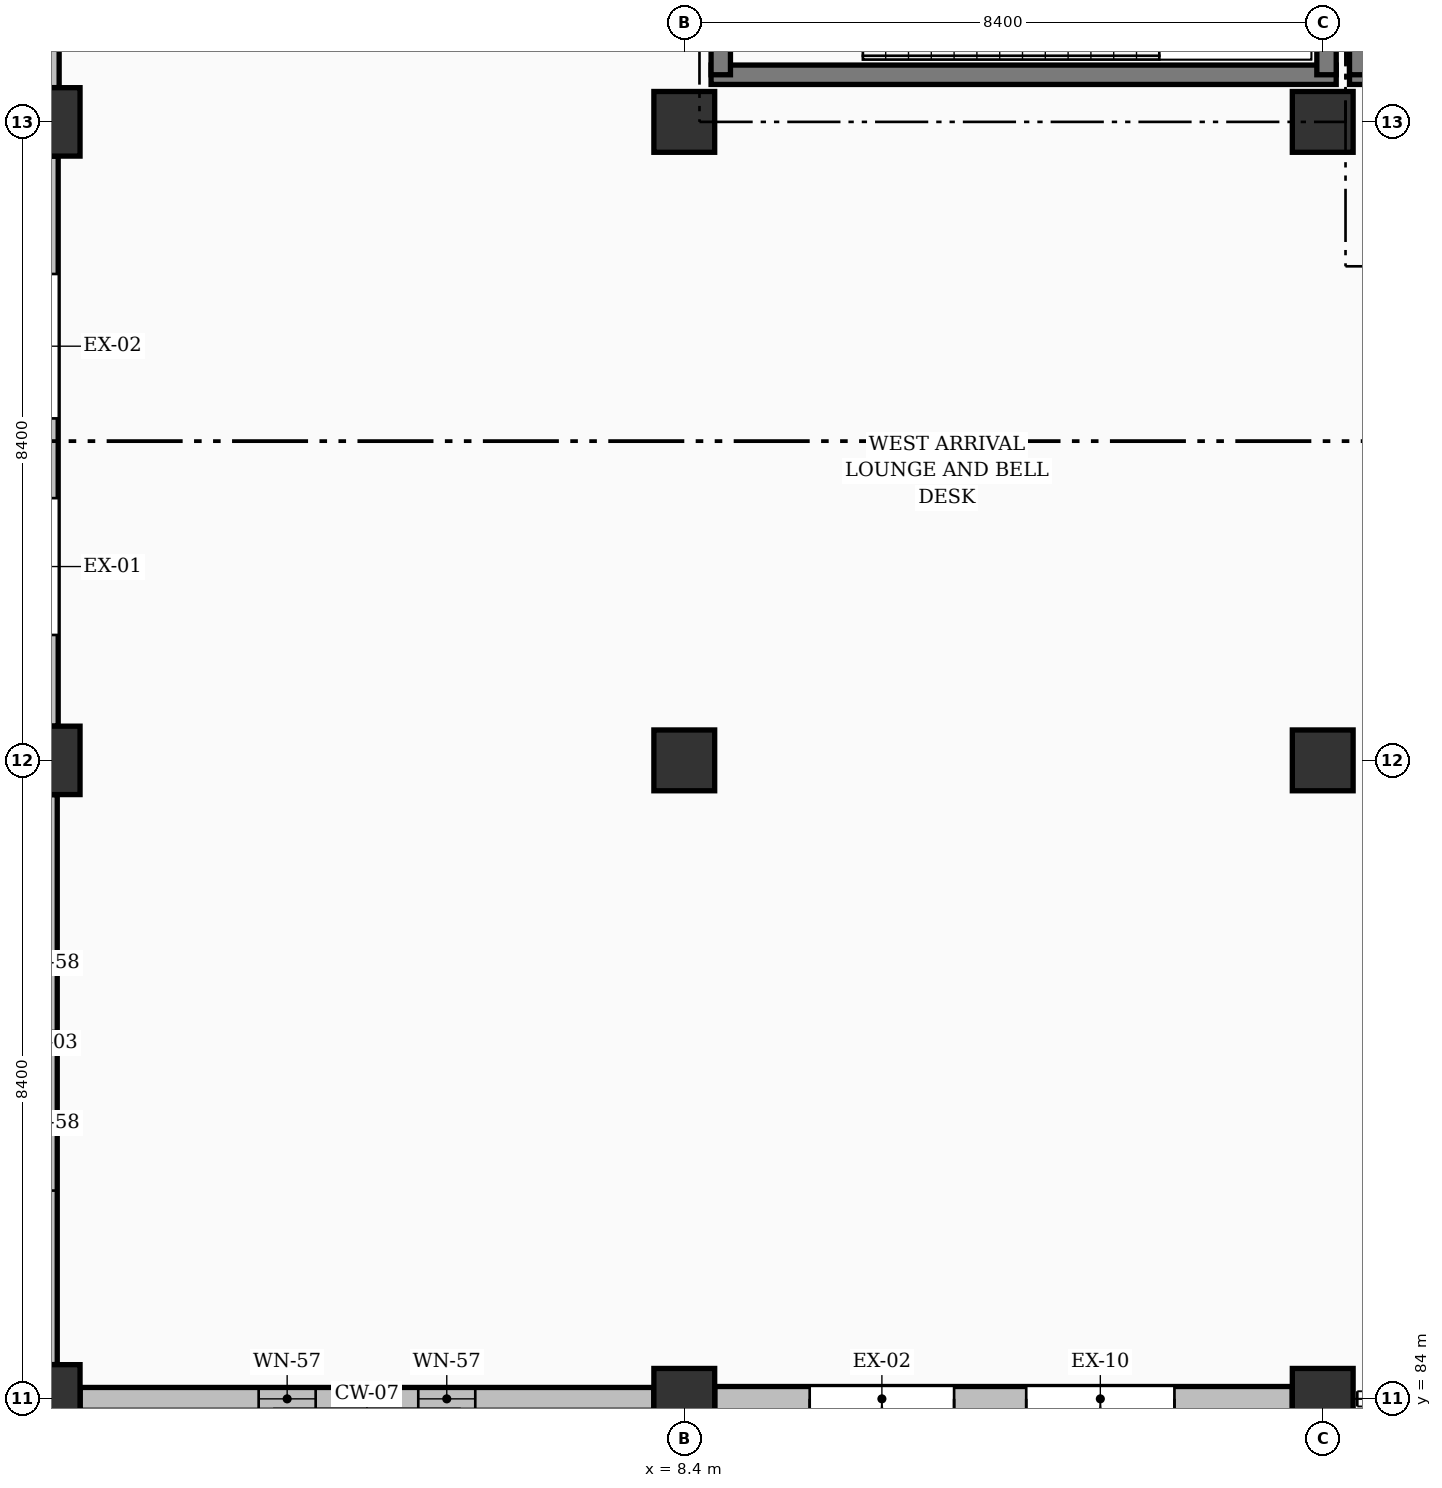
"""IFC4 building model, lengths in metres.
Left out: names, types, materials, properties, quantities, classifications, styles, units other than length and angle.
Written with IfcOpenShell. Run it as: python <this file> out.ifc"""

import sys

from ifc_helpers import new_model, si_unit, direction, frame, frame_2d, origin, origin_2d, place, context, subcontext, project, spatial, rectangle, extrude, element, fill, save


model = new_model("IFC4")
c1 = context("Model", 3, precision=1e-05, world=origin(), true_north=direction((0.0, 1.0)))
c2 = subcontext(c1, "Body", "Model", "MODEL_VIEW")
j1 = project(units=[si_unit("LENGTHUNIT", "METRE"), si_unit("PLANEANGLEUNIT", "RADIAN")], contexts=[c1])
p1 = place(None, origin())
s1 = spatial("IfcSite", under=j1, at=p1, CompositionType="ELEMENT")
p2 = place(p1, origin())
s2 = spatial("IfcBuilding", under=s1, at=p2, CompositionType="ELEMENT")
p3 = place(p2, origin())
s3 = spatial("IfcBuildingStorey", under=s2, at=p3, CompositionType="ELEMENT", Elevation=0.0)
for number, where, z_axis, x_axis in (
    (1, (0.0, 84.0, 0.0), (0.0, 0.0, 1.0), (1.0, 0.0, 0.0)),
    (2, (0.0, 92.4, 0.0), (0.0, 0.0, 1.0), (1.0, 0.0, 0.0)),
    (3, (0.0, 100.8, 0.0), (0.0, 0.0, 1.0), (1.0, 0.0, 0.0)),
):
    element("IfcColumn", number, at=place(p3, frame(where, z_axis=z_axis, x_axis=x_axis)), inside=s3, PredefinedType="COLUMN", context=c2, shape_type="SweptSolid", body=[
        extrude(rectangle(XDim=0.9, YDim=0.9, at=origin_2d()), origin(), (0.0, 0.0, 1.0), 3.92),
    ])
for number, where, z_axis, x_axis in (
    (4, (8.4, 84.0, 0.0), (0.0, 0.0, 1.0), (1.0, 0.0, 0.0)),
    (5, (8.4, 92.4, 0.0), (0.0, 0.0, 1.0), (1.0, 0.0, 0.0)),
    (6, (8.4, 100.8, 0.0), (0.0, 0.0, 1.0), (1.0, 0.0, 0.0)),
    (7, (16.8, 84.0, 0.0), (0.0, 0.0, 1.0), (1.0, 0.0, 0.0)),
    (8, (16.8, 92.4, 0.0), (0.0, 0.0, 1.0), (1.0, 0.0, 0.0)),
    (9, (16.8, 100.8, 0.0), (0.0, 0.0, 1.0), (1.0, 0.0, 0.0)),
):
    element("IfcColumn", number, at=place(p3, frame(where, z_axis=z_axis, x_axis=x_axis)), inside=s3, PredefinedType="COLUMN", context=c2, shape_type="SweptSolid", body=[
        extrude(rectangle(XDim=0.8, YDim=0.8, at=origin_2d()), origin(), (0.0, 0.0, 1.0), 3.92),
    ])
p4 = place(p3, frame((0.451, 84.0, 0.0), z_axis=(0.0, 0.0, 1.0), x_axis=(1.0, 0.0, 0.0)))
e10 = element("IfcWall", 10, at=p4, inside=s3, PredefinedType="SOLIDWALL", context=c2, shape_type="SweptSolid", body=[
    extrude(rectangle(XDim=7.548, YDim=0.3, at=frame_2d((3.774, 0.0))), origin(), (0.0, 0.0, 1.0), 2.825),
])
p5 = place(p4, frame((2.349, 0.0, 0.3)))
e11 = element("IfcOpeningElement", 11, at=p5, cuts=e10, PredefinedType="OPENING", context=c2, shape_type="SweptSolid", body=[
    extrude(rectangle(XDim=0.75, YDim=2.15, at=frame_2d((0.375, 1.075))), frame((0.0, 0.16, 0.0), z_axis=(0.0, -1.0, 0.0), x_axis=(1.0, 0.0, 0.0)), (0.0, 0.0, 1.0), 0.32),
])
p6 = place(p4, frame((4.449, 0.0, 0.3)))
e12 = element("IfcOpeningElement", 12, at=p6, cuts=e10, PredefinedType="OPENING", context=c2, shape_type="SweptSolid", body=[
    extrude(rectangle(XDim=0.75, YDim=2.15, at=frame_2d((0.375, 1.075))), frame((0.0, 0.16, 0.0), z_axis=(0.0, -1.0, 0.0), x_axis=(1.0, 0.0, 0.0)), (0.0, 0.0, 1.0), 0.32),
])
p7 = place(p3, frame((8.801, 84.0, 0.0), z_axis=(0.0, 0.0, 1.0), x_axis=(1.0, 0.0, 0.0)))
e13 = element("IfcWall", 13, at=p7, inside=s3, PredefinedType="SOLIDWALL", context=c2, shape_type="SweptSolid", body=[
    extrude(rectangle(XDim=7.598, YDim=0.325, at=frame_2d((3.799, 0.0))), origin(), (0.0, 0.0, 1.0), 2.825),
])
p8 = place(p7, frame((1.249, 0.0, 0.0)))
e14 = element("IfcOpeningElement", 14, at=p8, cuts=e13, PredefinedType="OPENING", context=c2, shape_type="SweptSolid", body=[
    extrude(rectangle(XDim=1.9, YDim=2.2, at=frame_2d((0.95, 1.1))), frame((0.0, 0.172, 0.0), z_axis=(0.0, -1.0, 0.0), x_axis=(1.0, 0.0, 0.0)), (0.0, 0.0, 1.0), 0.345),
])
p9 = place(p7, frame((4.098, 0.0, 0.0)))
e15 = element("IfcOpeningElement", 15, at=p9, cuts=e13, PredefinedType="OPENING", context=c2, shape_type="SweptSolid", body=[
    extrude(rectangle(XDim=1.95, YDim=2.25, at=frame_2d((0.975, 1.125))), frame((0.0, 0.172, 0.0), z_axis=(0.0, -1.0, 0.0), x_axis=(1.0, 0.0, 0.0)), (0.0, 0.0, 1.0), 0.345),
])
p10 = place(p3, frame((0.0, 84.451, 0.0), z_axis=(0.0, 0.0, 1.0), x_axis=(0.0, 1.0, 0.0)))
e16 = element("IfcWall", 16, at=p10, inside=s3, PredefinedType="SOLIDWALL", context=c2, shape_type="SweptSolid", body=[
    extrude(rectangle(XDim=7.498, YDim=0.3, at=frame_2d((3.749, 0.0))), origin(), (0.0, 0.0, 1.0), 2.975),
])
p11 = place(p10, frame((2.289, 0.0, 0.3)))
e17 = element("IfcOpeningElement", 17, at=p11, cuts=e16, PredefinedType="OPENING", context=c2, shape_type="SweptSolid", body=[
    extrude(rectangle(XDim=0.82, YDim=2.15, at=frame_2d((0.41, 1.075))), frame((0.0, 0.16, 0.0), z_axis=(0.0, -1.0, 0.0), x_axis=(1.0, 0.0, 0.0)), (0.0, 0.0, 1.0), 0.32),
])
p12 = place(p10, frame((4.389, 0.0, 0.3)))
e18 = element("IfcOpeningElement", 18, at=p12, cuts=e16, PredefinedType="OPENING", context=c2, shape_type="SweptSolid", body=[
    extrude(rectangle(XDim=0.82, YDim=2.15, at=frame_2d((0.41, 1.075))), frame((0.0, 0.16, 0.0), z_axis=(0.0, -1.0, 0.0), x_axis=(1.0, 0.0, 0.0)), (0.0, 0.0, 1.0), 0.32),
])
p13 = place(p3, frame((0.0, 92.851, 0.0), z_axis=(0.0, 0.0, 1.0), x_axis=(0.0, 1.0, 0.0)))
e19 = element("IfcWall", 19, at=p13, inside=s3, PredefinedType="SOLIDWALL", context=c2, shape_type="SweptSolid", body=[
    extrude(rectangle(XDim=7.498, YDim=0.325, at=frame_2d((3.749, 0.0))), origin(), (0.0, 0.0, 1.0), 2.775),
])
p14 = place(p13, frame((1.199, 0.0, 0.0)))
e20 = element("IfcOpeningElement", 20, at=p14, cuts=e19, PredefinedType="OPENING", context=c2, shape_type="SweptSolid", body=[
    extrude(rectangle(XDim=1.8, YDim=2.2, at=frame_2d((0.9, 1.1))), frame((0.0, 0.172, 0.0), z_axis=(0.0, -1.0, 0.0), x_axis=(1.0, 0.0, 0.0)), (0.0, 0.0, 1.0), 0.345),
])
p15 = place(p13, frame((4.048, 0.0, 0.0)))
e21 = element("IfcOpeningElement", 21, at=p15, cuts=e19, PredefinedType="OPENING", context=c2, shape_type="SweptSolid", body=[
    extrude(rectangle(XDim=1.9, YDim=2.2, at=frame_2d((0.95, 1.1))), frame((0.0, 0.172, 0.0), z_axis=(0.0, -1.0, 0.0), x_axis=(1.0, 0.0, 0.0)), (0.0, 0.0, 1.0), 0.345),
])
p16 = place(p3, frame((0.0, 101.251, 0.0), z_axis=(0.0, 0.0, 1.0), x_axis=(0.0, 1.0, 0.0)))
e22 = element("IfcWall", 22, at=p16, inside=s3, PredefinedType="SOLIDWALL", context=c2, shape_type="SweptSolid", body=[
    extrude(rectangle(XDim=7.498, YDim=0.35, at=frame_2d((3.749, 0.0))), origin(), (0.0, 0.0, 1.0), 2.975),
])
p17 = place(p16, frame((2.279, 0.0, 0.3)))
e23 = element("IfcOpeningElement", 23, at=p17, cuts=e22, PredefinedType="OPENING", context=c2, shape_type="SweptSolid", body=[
    extrude(rectangle(XDim=0.84, YDim=1.75, at=frame_2d((0.42, 0.875))), frame((0.0, 0.185, 0.0), z_axis=(0.0, -1.0, 0.0), x_axis=(1.0, 0.0, 0.0)), (0.0, 0.0, 1.0), 0.37),
])
p18 = place(p16, frame((4.379, 0.0, 0.3)))
e24 = element("IfcOpeningElement", 24, at=p18, cuts=e22, PredefinedType="OPENING", context=c2, shape_type="SweptSolid", body=[
    extrude(rectangle(XDim=0.84, YDim=1.75, at=frame_2d((0.42, 0.875))), frame((0.0, 0.185, 0.0), z_axis=(0.0, -1.0, 0.0), x_axis=(1.0, 0.0, 0.0)), (0.0, 0.0, 1.0), 0.37),
])
p19 = place(p3, frame((8.752, 101.42, 0.0), z_axis=(0.0, 0.0, 1.0), x_axis=(1.0, 0.0, 0.0)))
e25 = element("IfcWall", 25, at=p19, inside=s3, PredefinedType="SOLIDWALL", context=c2, shape_type="SweptSolid", body=[
    extrude(rectangle(XDim=8.225, YDim=0.255, at=frame_2d((4.113, 0.0))), origin(), (0.0, 0.0, 1.0), 3.64),
])
for number, where, z_axis, x_axis in (
    (26, (8.88, 101.42, 0.0), (0.0, 0.0, 1.0), (0.0, 1.0, 0.0)),
    (27, (16.85, 101.42, 0.0), (0.0, 0.0, 1.0), (0.0, 1.0, 0.0)),
):
    element("IfcWall", number, at=place(p3, frame(where, z_axis=z_axis, x_axis=x_axis)), inside=s3, PredefinedType="SOLIDWALL", context=c2, shape_type="SweptSolid", body=[
        extrude(rectangle(XDim=3.73, YDim=0.255, at=frame_2d((1.865, 0.0))), origin(), (0.0, 0.0, 1.0), 3.64),
    ])
p20 = place(p3, frame((17.153, 101.42, 0.0), z_axis=(0.0, 0.0, 1.0), x_axis=(1.0, 0.0, 0.0)))
e28 = element("IfcWall", 28, at=p20, inside=s3, PredefinedType="SOLIDWALL", context=c2, shape_type="SweptSolid", body=[
    extrude(rectangle(XDim=8.225, YDim=0.255, at=frame_2d((4.112, 0.0))), origin(), (0.0, 0.0, 1.0), 3.64),
])
p21 = place(p3, frame((17.28, 101.42, 0.0), z_axis=(0.0, 0.0, 1.0), x_axis=(0.0, 1.0, 0.0)))
e29 = element("IfcWall", 29, at=p21, inside=s3, PredefinedType="SOLIDWALL", context=c2, shape_type="SweptSolid", body=[
    extrude(rectangle(XDim=3.73, YDim=0.255, at=frame_2d((1.865, 0.0))), origin(), (0.0, 0.0, 1.0), 3.64),
])
p22 = place(p5, origin())
e30 = element("IfcWindow", 30, at=p22, inside=s3, PartitioningType="SINGLE_PANEL", PredefinedType="WINDOW", context=c2, shape_type="SweptSolid", body=[
    extrude(rectangle(XDim=0.75, YDim=2.15, at=frame_2d((0.375, 1.075))), frame((0.0, 0.03, 0.0), z_axis=(0.0, -1.0, 0.0), x_axis=(1.0, 0.0, 0.0)), (0.0, 0.0, 1.0), 0.06),
])
fill(e11, e30)
p23 = place(p6, origin())
e31 = element("IfcWindow", 31, at=p23, inside=s3, PartitioningType="SINGLE_PANEL", PredefinedType="WINDOW", context=c2, shape_type="SweptSolid", body=[
    extrude(rectangle(XDim=0.75, YDim=2.15, at=frame_2d((0.375, 1.075))), frame((0.0, 0.03, 0.0), z_axis=(0.0, -1.0, 0.0), x_axis=(1.0, 0.0, 0.0)), (0.0, 0.0, 1.0), 0.06),
])
fill(e12, e31)
p24 = place(p8, frame((1.9, 0.0, 0.0), z_axis=(0.0, 0.0, 1.0), x_axis=(-1.0, 0.0, 0.0)))
e32 = element("IfcDoor", 32, at=p24, inside=s3, OperationType="DOUBLE_DOOR_SINGLE_SWING", PredefinedType="DOOR", context=c2, shape_type="SweptSolid", body=[
    extrude(rectangle(XDim=1.9, YDim=2.2, at=frame_2d((0.95, 1.1))), frame((0.0, 0.025, 0.0), z_axis=(0.0, -1.0, 0.0), x_axis=(1.0, 0.0, 0.0)), (0.0, 0.0, 1.0), 0.05),
])
fill(e14, e32)
p25 = place(p9, frame((1.95, 0.0, 0.0), z_axis=(0.0, 0.0, 1.0), x_axis=(-1.0, 0.0, 0.0)))
e33 = element("IfcDoor", 33, at=p25, inside=s3, OperationType="DOUBLE_DOOR_SINGLE_SWING", PredefinedType="DOOR", context=c2, shape_type="SweptSolid", body=[
    extrude(rectangle(XDim=1.95, YDim=2.25, at=frame_2d((0.975, 1.125))), frame((0.0, 0.025, 0.0), z_axis=(0.0, -1.0, 0.0), x_axis=(1.0, 0.0, 0.0)), (0.0, 0.0, 1.0), 0.05),
])
fill(e15, e33)
save(model, sys.argv[1])
